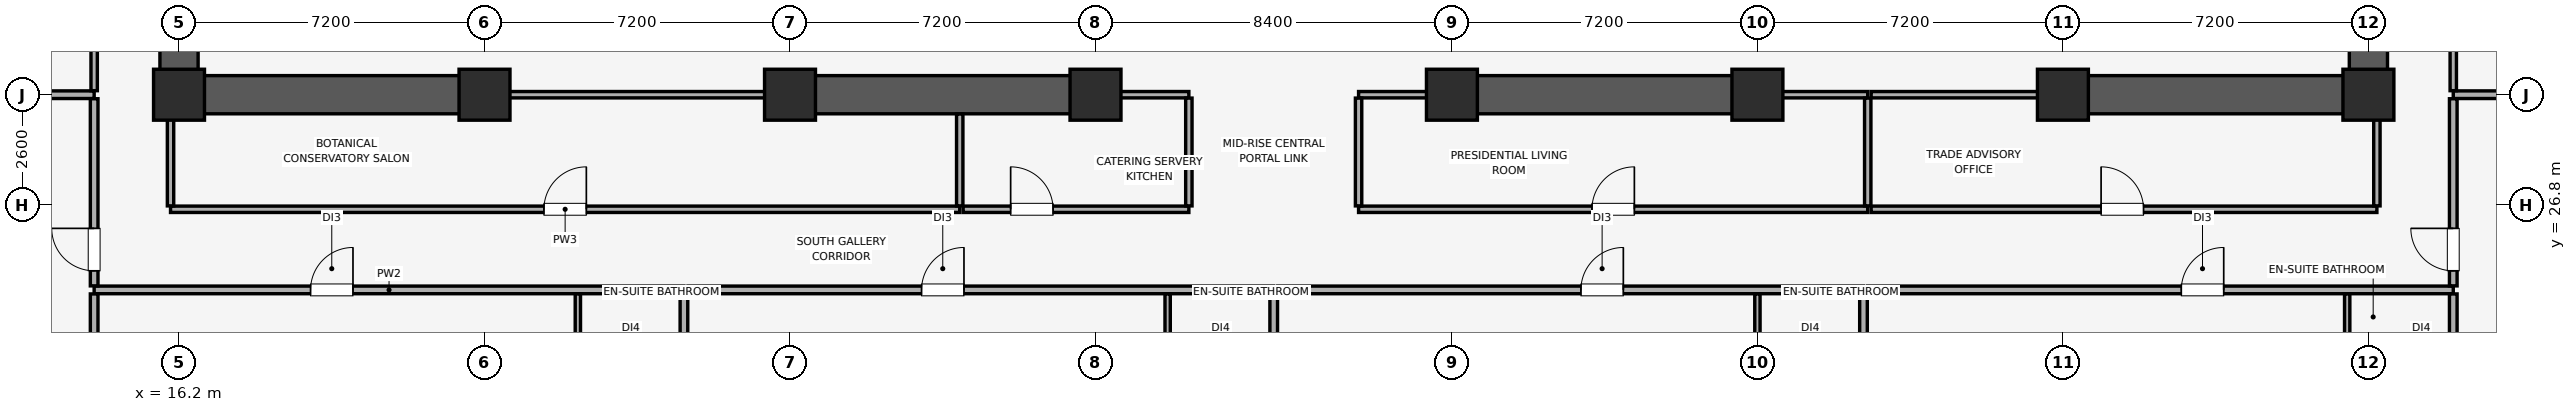
"""IFC4 building model, lengths in metres.
Left out: names, types, materials, properties, quantities, classifications, styles, units other than length and angle.
Written with IfcOpenShell. Run it as: python <this file> out.ifc"""

import sys

from ifc_helpers import new_model, si_unit, direction, frame, frame_2d, origin, origin_2d, place, context, subcontext, project, spatial, rectangle, extrude, element, fill, save


model = new_model("IFC4")
c1 = context("Model", 3, precision=1e-05, world=origin(), true_north=direction((0.0, 1.0)))
c2 = subcontext(c1, "Body", "Model", "MODEL_VIEW")
j1 = project(units=[si_unit("LENGTHUNIT", "METRE"), si_unit("PLANEANGLEUNIT", "RADIAN")], contexts=[c1])
p1 = place(None, origin())
s1 = spatial("IfcSite", under=j1, at=p1, CompositionType="ELEMENT")
p2 = place(p1, origin())
s2 = spatial("IfcBuilding", under=s1, at=p2, CompositionType="ELEMENT")
p3 = place(p2, frame((0.0, 0.0, 220.55)))
s3 = spatial("IfcBuildingStorey", under=s2, at=p3, CompositionType="ELEMENT", Elevation=220.55)
for number, where, z_axis, x_axis in (
    (1, (16.2, 29.4, 0.0), (0.0, 0.0, 1.0), (1.0, 0.0, 0.0)),
    (2, (23.4, 29.4, 0.0), (0.0, 0.0, 1.0), (1.0, 0.0, 0.0)),
    (3, (30.6, 29.4, 0.0), (0.0, 0.0, 1.0), (1.0, 0.0, 0.0)),
    (4, (37.8, 29.4, 0.0), (0.0, 0.0, 1.0), (1.0, 0.0, 0.0)),
    (5, (46.2, 29.4, 0.0), (0.0, 0.0, 1.0), (1.0, 0.0, 0.0)),
    (6, (53.4, 29.4, 0.0), (0.0, 0.0, 1.0), (1.0, 0.0, 0.0)),
    (7, (60.6, 29.4, 0.0), (0.0, 0.0, 1.0), (1.0, 0.0, 0.0)),
    (8, (67.8, 29.4, 0.0), (0.0, 0.0, 1.0), (1.0, 0.0, 0.0)),
):
    element("IfcColumn", number, at=place(p3, frame(where, z_axis=z_axis, x_axis=x_axis)), inside=s3, PredefinedType="COLUMN", context=c2, shape_type="SweptSolid", body=[
        extrude(rectangle(XDim=1.2, YDim=1.2, at=origin_2d()), origin(), (0.0, 0.0, 1.0), 3.56),
    ])
for number, where, z_axis, x_axis in (
    (9, (16.2, 29.4, 0.0), (0.0, 0.0, 1.0), (0.0, 1.0, 0.0)),
    (10, (67.8, 29.4, 0.0), (0.0, 0.0, 1.0), (0.0, 1.0, 0.0)),
):
    element("IfcWall", number, at=place(p3, frame(where, z_axis=z_axis, x_axis=x_axis)), inside=s3, PredefinedType="SHEAR", context=c2, shape_type="SweptSolid", body=[
        extrude(rectangle(XDim=19.2, YDim=0.9, at=frame_2d((9.6, 0.0))), origin(), (0.0, 0.0, 1.0), 3.56),
    ])
p4 = place(p3, frame((16.655, 29.4, 0.0), z_axis=(0.0, 0.0, 1.0), x_axis=(1.0, 0.0, 0.0)))
e11 = element("IfcWall", 11, at=p4, inside=s3, PredefinedType="SHEAR", context=c2, shape_type="SweptSolid", body=[
    extrude(rectangle(XDim=6.945, YDim=0.9, at=frame_2d((3.473, 0.0))), origin(), (0.0, 0.0, 1.0), 3.56),
])
for number, where, z_axis, x_axis in (
    (12, (30.4, 29.4, 0.0), (0.0, 0.0, 1.0), (1.0, 0.0, 0.0)),
    (13, (46.0, 29.4, 0.0), (0.0, 0.0, 1.0), (1.0, 0.0, 0.0)),
):
    element("IfcWall", number, at=place(p3, frame(where, z_axis=z_axis, x_axis=x_axis)), inside=s3, PredefinedType="SHEAR", context=c2, shape_type="SweptSolid", body=[
        extrude(rectangle(XDim=7.6, YDim=0.9, at=frame_2d((3.8, 0.0))), origin(), (0.0, 0.0, 1.0), 3.56),
    ])
p5 = place(p3, frame((60.4, 29.4, 0.0), z_axis=(0.0, 0.0, 1.0), x_axis=(1.0, 0.0, 0.0)))
e14 = element("IfcWall", 14, at=p5, inside=s3, PredefinedType="SHEAR", context=c2, shape_type="SweptSolid", body=[
    extrude(rectangle(XDim=6.945, YDim=0.9, at=frame_2d((3.473, 0.0))), origin(), (0.0, 0.0, 1.0), 3.56),
])
p6 = place(p3, frame((14.2, 24.8, 0.0), z_axis=(0.0, 0.0, 1.0), x_axis=(1.0, 0.0, 0.0)))
e15 = element("IfcWall", 15, at=p6, inside=s3, PredefinedType="PARTITIONING", context=c2, shape_type="SweptSolid", body=[
    extrude(rectangle(XDim=13.9, YDim=0.18, at=frame_2d((6.95, 0.0))), origin(), (0.0, 0.0, 1.0), 3.56),
])
p7 = place(p6, frame((5.1, 0.0, 0.0)))
e16 = element("IfcOpeningElement", 16, at=p7, cuts=e15, PredefinedType="OPENING", context=c2, shape_type="SweptSolid", body=[
    extrude(rectangle(XDim=1.0, YDim=2.15, at=frame_2d((0.5, 1.075))), frame((0.0, 0.1, 0.0), z_axis=(0.0, -1.0, 0.0), x_axis=(1.0, 0.0, 0.0)), (0.0, 0.0, 1.0), 0.2),
])
for number, where, z_axis, x_axis in (
    (17, (14.2, 3.15, 0.0), (0.0, 0.0, 1.0), (0.0, 1.0, 0.0)),
    (18, (28.1, 3.15, 0.0), (0.0, 0.0, 1.0), (0.0, 1.0, 0.0)),
):
    element("IfcWall", number, at=place(p3, frame(where, z_axis=z_axis, x_axis=x_axis)), inside=s3, PredefinedType="PARTITIONING", context=c2, shape_type="SweptSolid", body=[
        extrude(rectangle(XDim=21.555, YDim=0.18, at=frame_2d((10.778, 0.0))), origin(), (0.0, 0.0, 1.0), 3.56),
    ])
p8 = place(p3, frame((25.6, 22.317, 0.0), z_axis=(0.0, 0.0, 1.0), x_axis=(0.0, 1.0, 0.0)))
e19 = element("IfcWall", 19, at=p8, inside=s3, PredefinedType="PARTITIONING", context=c2, shape_type="SweptSolid", body=[
    extrude(rectangle(XDim=2.388, YDim=0.125, at=frame_2d((1.194, 0.0))), origin(), (0.0, 0.0, 1.0), 3.56),
])
p9 = place(p3, frame((28.195, 24.8, 0.0), z_axis=(0.0, 0.0, 1.0), x_axis=(1.0, 0.0, 0.0)))
e20 = element("IfcWall", 20, at=p9, inside=s3, PredefinedType="PARTITIONING", context=c2, shape_type="SweptSolid", body=[
    extrude(rectangle(XDim=13.805, YDim=0.18, at=frame_2d((6.902, 0.0))), origin(), (0.0, 0.0, 1.0), 3.56),
])
p10 = place(p9, frame((5.505, 0.0, 0.0)))
e21 = element("IfcOpeningElement", 21, at=p10, cuts=e20, PredefinedType="OPENING", context=c2, shape_type="SweptSolid", body=[
    extrude(rectangle(XDim=1.0, YDim=2.15, at=frame_2d((0.5, 1.075))), frame((0.0, 0.1, 0.0), z_axis=(0.0, -1.0, 0.0), x_axis=(1.0, 0.0, 0.0)), (0.0, 0.0, 1.0), 0.2),
])
p11 = place(p3, frame((42.0, 3.15, 0.0), z_axis=(0.0, 0.0, 1.0), x_axis=(0.0, 1.0, 0.0)))
e22 = element("IfcWall", 22, at=p11, inside=s3, PredefinedType="PARTITIONING", context=c2, shape_type="SweptSolid", body=[
    extrude(rectangle(XDim=21.555, YDim=0.18, at=frame_2d((10.778, 0.0))), origin(), (0.0, 0.0, 1.0), 2.96),
])
p12 = place(p3, frame((39.5, 22.317, 0.0), z_axis=(0.0, 0.0, 1.0), x_axis=(0.0, 1.0, 0.0)))
e23 = element("IfcWall", 23, at=p12, inside=s3, PredefinedType="PARTITIONING", context=c2, shape_type="SweptSolid", body=[
    extrude(rectangle(XDim=2.388, YDim=0.125, at=frame_2d((1.194, 0.0))), origin(), (0.0, 0.0, 1.0), 3.56),
])
p13 = place(p3, frame((42.095, 24.8, 0.0), z_axis=(0.0, 0.0, 1.0), x_axis=(1.0, 0.0, 0.0)))
e24 = element("IfcWall", 24, at=p13, inside=s3, PredefinedType="PARTITIONING", context=c2, shape_type="SweptSolid", body=[
    extrude(rectangle(XDim=13.805, YDim=0.18, at=frame_2d((6.902, 0.0))), origin(), (0.0, 0.0, 1.0), 3.56),
])
p14 = place(p13, frame((7.145, 0.0, 0.0)))
e25 = element("IfcOpeningElement", 25, at=p14, cuts=e24, PredefinedType="OPENING", context=c2, shape_type="SweptSolid", body=[
    extrude(rectangle(XDim=1.0, YDim=2.15, at=frame_2d((0.5, 1.075))), frame((0.0, 0.1, 0.0), z_axis=(0.0, -1.0, 0.0), x_axis=(1.0, 0.0, 0.0)), (0.0, 0.0, 1.0), 0.2),
])
p15 = place(p3, frame((55.9, 3.15, 0.0), z_axis=(0.0, 0.0, 1.0), x_axis=(0.0, 1.0, 0.0)))
e26 = element("IfcWall", 26, at=p15, inside=s3, PredefinedType="PARTITIONING", context=c2, shape_type="SweptSolid", body=[
    extrude(rectangle(XDim=21.555, YDim=0.18, at=frame_2d((10.778, 0.0))), origin(), (0.0, 0.0, 1.0), 3.56),
])
p16 = place(p3, frame((53.4, 22.317, 0.0), z_axis=(0.0, 0.0, 1.0), x_axis=(0.0, 1.0, 0.0)))
e27 = element("IfcWall", 27, at=p16, inside=s3, PredefinedType="PARTITIONING", context=c2, shape_type="SweptSolid", body=[
    extrude(rectangle(XDim=2.388, YDim=0.125, at=frame_2d((1.194, 0.0))), origin(), (0.0, 0.0, 1.0), 3.06),
])
p17 = place(p3, frame((55.995, 24.8, 0.0), z_axis=(0.0, 0.0, 1.0), x_axis=(1.0, 0.0, 0.0)))
e28 = element("IfcWall", 28, at=p17, inside=s3, PredefinedType="PARTITIONING", context=c2, shape_type="SweptSolid", body=[
    extrude(rectangle(XDim=13.805, YDim=0.18, at=frame_2d((6.902, 0.0))), origin(), (0.0, 0.0, 1.0), 3.56),
])
p18 = place(p17, frame((7.395, 0.0, 0.0)))
e29 = element("IfcOpeningElement", 29, at=p18, cuts=e28, PredefinedType="OPENING", context=c2, shape_type="SweptSolid", body=[
    extrude(rectangle(XDim=1.0, YDim=2.15, at=frame_2d((0.5, 1.075))), frame((0.0, 0.1, 0.0), z_axis=(0.0, -1.0, 0.0), x_axis=(1.0, 0.0, 0.0)), (0.0, 0.0, 1.0), 0.2),
])
p19 = place(p3, frame((69.8, 3.15, 0.0), z_axis=(0.0, 0.0, 1.0), x_axis=(0.0, 1.0, 0.0)))
e30 = element("IfcWall", 30, at=p19, inside=s3, PredefinedType="PARTITIONING", context=c2, shape_type="SweptSolid", body=[
    extrude(rectangle(XDim=21.555, YDim=0.18, at=frame_2d((10.778, 0.0))), origin(), (0.0, 0.0, 1.0), 3.56),
])
p20 = place(p3, frame((67.3, 22.317, 0.0), z_axis=(0.0, 0.0, 1.0), x_axis=(0.0, 1.0, 0.0)))
e31 = element("IfcWall", 31, at=p20, inside=s3, PredefinedType="PARTITIONING", context=c2, shape_type="SweptSolid", body=[
    extrude(rectangle(XDim=2.388, YDim=0.125, at=frame_2d((1.194, 0.0))), origin(), (0.0, 0.0, 1.0), 3.56),
])
p21 = place(p3, frame((3.15, 29.4, 0.0), z_axis=(0.0, 0.0, 1.0), x_axis=(1.0, 0.0, 0.0)))
e32 = element("IfcWall", 32, at=p21, inside=s3, PredefinedType="PARTITIONING", context=c2, shape_type="SweptSolid", body=[
    extrude(rectangle(XDim=11.05, YDim=0.18, at=frame_2d((5.525, 0.0))), origin(), (0.0, 0.0, 1.0), 2.719),
])
p22 = place(p3, frame((14.2, 24.895, 0.0), z_axis=(0.0, 0.0, 1.0), x_axis=(0.0, 1.0, 0.0)))
e33 = element("IfcWall", 33, at=p22, inside=s3, PredefinedType="PARTITIONING", context=c2, shape_type="SweptSolid", body=[
    extrude(rectangle(XDim=4.41, YDim=0.18, at=frame_2d((2.205, 0.0))), origin(), (0.0, 0.0, 1.0), 3.56),
])
p23 = place(p22, frame((0.355, 0.0, 0.0)))
e34 = element("IfcOpeningElement", 34, at=p23, cuts=e33, PredefinedType="OPENING", context=c2, shape_type="SweptSolid", body=[
    extrude(rectangle(XDim=1.0, YDim=2.15, at=frame_2d((0.5, 1.075))), frame((0.0, 0.1, 0.0), z_axis=(0.0, -1.0, 0.0), x_axis=(1.0, 0.0, 0.0)), (0.0, 0.0, 1.0), 0.2),
])
p24 = place(p3, frame((69.8, 29.4, 0.0), z_axis=(0.0, 0.0, 1.0), x_axis=(1.0, 0.0, 0.0)))
e35 = element("IfcWall", 35, at=p24, inside=s3, PredefinedType="PARTITIONING", context=c2, shape_type="SweptSolid", body=[
    extrude(rectangle(XDim=11.05, YDim=0.18, at=frame_2d((5.525, 0.0))), origin(), (0.0, 0.0, 1.0), 2.719),
])
p25 = place(p3, frame((69.8, 24.895, 0.0), z_axis=(0.0, 0.0, 1.0), x_axis=(0.0, 1.0, 0.0)))
e36 = element("IfcWall", 36, at=p25, inside=s3, PredefinedType="PARTITIONING", context=c2, shape_type="SweptSolid", body=[
    extrude(rectangle(XDim=4.41, YDim=0.18, at=frame_2d((2.205, 0.0))), origin(), (0.0, 0.0, 1.0), 3.56),
])
p26 = place(p25, frame((0.355, 0.0, 0.0)))
e37 = element("IfcOpeningElement", 37, at=p26, cuts=e36, PredefinedType="OPENING", context=c2, shape_type="SweptSolid", body=[
    extrude(rectangle(XDim=1.0, YDim=2.15, at=frame_2d((0.5, 1.075))), frame((0.0, 0.1, 0.0), z_axis=(0.0, -1.0, 0.0), x_axis=(1.0, 0.0, 0.0)), (0.0, 0.0, 1.0), 0.2),
])
p27 = place(p3, frame((16.0, 26.7, 0.0), z_axis=(0.0, 0.0, 1.0), x_axis=(1.0, 0.0, 0.0)))
e38 = element("IfcWall", 38, at=p27, inside=s3, PredefinedType="PARTITIONING", context=c2, shape_type="SweptSolid", body=[
    extrude(rectangle(XDim=18.6, YDim=0.15, at=frame_2d((9.3, 0.0))), origin(), (0.0, 0.0, 1.0), 3.56),
])
p28 = place(p27, frame((8.8, 0.0, 0.0)))
e39 = element("IfcOpeningElement", 39, at=p28, cuts=e38, PredefinedType="OPENING", context=c2, shape_type="SweptSolid", body=[
    extrude(rectangle(XDim=1.0, YDim=2.15, at=frame_2d((0.5, 1.075))), frame((0.0, 0.085, 0.0), z_axis=(0.0, -1.0, 0.0), x_axis=(1.0, 0.0, 0.0)), (0.0, 0.0, 1.0), 0.17),
])
p29 = place(p3, frame((23.61, 29.4, 0.0), z_axis=(0.0, 0.0, 1.0), x_axis=(1.0, 0.0, 0.0)))
e40 = element("IfcWall", 40, at=p29, inside=s3, PredefinedType="PARTITIONING", context=c2, shape_type="SweptSolid", body=[
    extrude(rectangle(XDim=6.78, YDim=0.15, at=frame_2d((3.39, 0.0))), origin(), (0.0, 0.0, 1.0), 2.46),
])
p30 = place(p3, frame((16.0, 26.78, 0.0), z_axis=(0.0, 0.0, 1.0), x_axis=(0.0, 1.0, 0.0)))
e41 = element("IfcWall", 41, at=p30, inside=s3, PredefinedType="PARTITIONING", context=c2, shape_type="SweptSolid", body=[
    extrude(rectangle(XDim=2.61, YDim=0.15, at=frame_2d((1.305, 0.0))), origin(), (0.0, 0.0, 1.0), 3.06),
])
p31 = place(p3, frame((34.6, 26.78, 0.0), z_axis=(0.0, 0.0, 1.0), x_axis=(0.0, 1.0, 0.0)))
e42 = element("IfcWall", 42, at=p31, inside=s3, PredefinedType="PARTITIONING", context=c2, shape_type="SweptSolid", body=[
    extrude(rectangle(XDim=2.165, YDim=0.15, at=frame_2d((1.083, 0.0))), origin(), (0.0, 0.0, 1.0), 3.56),
])
p32 = place(p3, frame((34.68, 26.7, 0.0), z_axis=(0.0, 0.0, 1.0), x_axis=(1.0, 0.0, 0.0)))
e43 = element("IfcWall", 43, at=p32, inside=s3, PredefinedType="PARTITIONING", context=c2, shape_type="SweptSolid", body=[
    extrude(rectangle(XDim=5.32, YDim=0.15, at=frame_2d((2.66, 0.0))), origin(), (0.0, 0.0, 1.0), 3.56),
])
p33 = place(p32, frame((1.12, 0.0, 0.0)))
e44 = element("IfcOpeningElement", 44, at=p33, cuts=e43, PredefinedType="OPENING", context=c2, shape_type="SweptSolid", body=[
    extrude(rectangle(XDim=1.0, YDim=2.15, at=frame_2d((0.5, 1.075))), frame((0.0, 0.085, 0.0), z_axis=(0.0, -1.0, 0.0), x_axis=(1.0, 0.0, 0.0)), (0.0, 0.0, 1.0), 0.17),
])
p34 = place(p3, frame((38.01, 29.4, 0.0), z_axis=(0.0, 0.0, 1.0), x_axis=(1.0, 0.0, 0.0)))
e45 = element("IfcWall", 45, at=p34, inside=s3, PredefinedType="PARTITIONING", context=c2, shape_type="SweptSolid", body=[
    extrude(rectangle(XDim=1.99, YDim=0.15, at=frame_2d((0.995, 0.0))), origin(), (0.0, 0.0, 1.0), 2.46),
])
p35 = place(p3, frame((40.0, 26.78, 0.0), z_axis=(0.0, 0.0, 1.0), x_axis=(0.0, 1.0, 0.0)))
e46 = element("IfcWall", 46, at=p35, inside=s3, PredefinedType="PARTITIONING", context=c2, shape_type="SweptSolid", body=[
    extrude(rectangle(XDim=2.54, YDim=0.15, at=frame_2d((1.27, 0.0))), origin(), (0.0, 0.0, 1.0), 3.56),
])
p36 = place(p3, frame((44.0, 26.7, 0.0), z_axis=(0.0, 0.0, 1.0), x_axis=(1.0, 0.0, 0.0)))
e47 = element("IfcWall", 47, at=p36, inside=s3, PredefinedType="PARTITIONING", context=c2, shape_type="SweptSolid", body=[
    extrude(rectangle(XDim=12.0, YDim=0.15, at=frame_2d((6.0, 0.0))), origin(), (0.0, 0.0, 1.0), 3.56),
])
p37 = place(p36, frame((5.5, 0.0, 0.0)))
e48 = element("IfcOpeningElement", 48, at=p37, cuts=e47, PredefinedType="OPENING", context=c2, shape_type="SweptSolid", body=[
    extrude(rectangle(XDim=1.0, YDim=2.15, at=frame_2d((0.5, 1.075))), frame((0.0, 0.085, 0.0), z_axis=(0.0, -1.0, 0.0), x_axis=(1.0, 0.0, 0.0)), (0.0, 0.0, 1.0), 0.17),
])
p38 = place(p3, frame((44.0, 29.4, 0.0), z_axis=(0.0, 0.0, 1.0), x_axis=(1.0, 0.0, 0.0)))
e49 = element("IfcWall", 49, at=p38, inside=s3, PredefinedType="PARTITIONING", context=c2, shape_type="SweptSolid", body=[
    extrude(rectangle(XDim=1.99, YDim=0.15, at=frame_2d((0.995, 0.0))), origin(), (0.0, 0.0, 1.0), 2.46),
])
p39 = place(p3, frame((53.61, 29.4, 0.0), z_axis=(0.0, 0.0, 1.0), x_axis=(1.0, 0.0, 0.0)))
e50 = element("IfcWall", 50, at=p39, inside=s3, PredefinedType="PARTITIONING", context=c2, shape_type="SweptSolid", body=[
    extrude(rectangle(XDim=2.39, YDim=0.15, at=frame_2d((1.195, 0.0))), origin(), (0.0, 0.0, 1.0), 2.46),
])
for number, where, z_axis, x_axis in (
    (51, (44.0, 26.78, 0.0), (0.0, 0.0, 1.0), (0.0, 1.0, 0.0)),
    (52, (56.0, 26.78, 0.0), (0.0, 0.0, 1.0), (0.0, 1.0, 0.0)),
):
    element("IfcWall", number, at=place(p3, frame(where, z_axis=z_axis, x_axis=x_axis)), inside=s3, PredefinedType="PARTITIONING", context=c2, shape_type="SweptSolid", body=[
        extrude(rectangle(XDim=2.54, YDim=0.15, at=frame_2d((1.27, 0.0))), origin(), (0.0, 0.0, 1.0), 3.56),
    ])
p40 = place(p3, frame((56.08, 26.7, 0.0), z_axis=(0.0, 0.0, 1.0), x_axis=(1.0, 0.0, 0.0)))
e53 = element("IfcWall", 53, at=p40, inside=s3, PredefinedType="PARTITIONING", context=c2, shape_type="SweptSolid", body=[
    extrude(rectangle(XDim=11.92, YDim=0.15, at=frame_2d((5.96, 0.0))), origin(), (0.0, 0.0, 1.0), 3.56),
])
p41 = place(p40, frame((5.42, 0.0, 0.0)))
e54 = element("IfcOpeningElement", 54, at=p41, cuts=e53, PredefinedType="OPENING", context=c2, shape_type="SweptSolid", body=[
    extrude(rectangle(XDim=1.0, YDim=2.15, at=frame_2d((0.5, 1.075))), frame((0.0, 0.085, 0.0), z_axis=(0.0, -1.0, 0.0), x_axis=(1.0, 0.0, 0.0)), (0.0, 0.0, 1.0), 0.17),
])
p42 = place(p3, frame((56.08, 29.4, 0.0), z_axis=(0.0, 0.0, 1.0), x_axis=(1.0, 0.0, 0.0)))
e55 = element("IfcWall", 55, at=p42, inside=s3, PredefinedType="PARTITIONING", context=c2, shape_type="SweptSolid", body=[
    extrude(rectangle(XDim=4.31, YDim=0.15, at=frame_2d((2.155, 0.0))), origin(), (0.0, 0.0, 1.0), 2.46),
])
p43 = place(p3, frame((68.0, 26.78, 0.0), z_axis=(0.0, 0.0, 1.0), x_axis=(0.0, 1.0, 0.0)))
e56 = element("IfcWall", 56, at=p43, inside=s3, PredefinedType="PARTITIONING", context=c2, shape_type="SweptSolid", body=[
    extrude(rectangle(XDim=2.61, YDim=0.15, at=frame_2d((1.305, 0.0))), origin(), (0.0, 0.0, 1.0), 3.06),
])
p44 = place(p3, frame((14.2, 29.495, 0.0), z_axis=(0.0, 0.0, 1.0), x_axis=(0.0, 1.0, 0.0)))
e57 = element("IfcWall", 57, at=p44, inside=s3, PredefinedType="PARTITIONING", context=c2, shape_type="SweptSolid", body=[
    extrude(rectangle(XDim=6.625, YDim=0.15, at=frame_2d((3.312, 0.0))), origin(), (0.0, 0.0, 1.0), 3.56),
])
p45 = place(p44, frame((2.805, 0.0, 0.0)))
e58 = element("IfcOpeningElement", 58, at=p45, cuts=e57, PredefinedType="OPENING", context=c2, shape_type="SweptSolid", body=[
    extrude(rectangle(XDim=1.0, YDim=2.15, at=frame_2d((0.5, 1.075))), frame((0.0, 0.085, 0.0), z_axis=(0.0, -1.0, 0.0), x_axis=(1.0, 0.0, 0.0)), (0.0, 0.0, 1.0), 0.17),
])
p46 = place(p3, frame((69.8, 29.495, 0.0), z_axis=(0.0, 0.0, 1.0), x_axis=(0.0, 1.0, 0.0)))
e59 = element("IfcWall", 59, at=p46, inside=s3, PredefinedType="PARTITIONING", context=c2, shape_type="SweptSolid", body=[
    extrude(rectangle(XDim=8.925, YDim=0.15, at=frame_2d((4.462, 0.0))), origin(), (0.0, 0.0, 1.0), 3.56),
])
p47 = place(p46, frame((3.955, 0.0, 0.0)))
e60 = element("IfcOpeningElement", 60, at=p47, cuts=e59, PredefinedType="OPENING", context=c2, shape_type="SweptSolid", body=[
    extrude(rectangle(XDim=1.0, YDim=2.15, at=frame_2d((0.5, 1.075))), frame((0.0, 0.085, 0.0), z_axis=(0.0, -1.0, 0.0), x_axis=(1.0, 0.0, 0.0)), (0.0, 0.0, 1.0), 0.17),
])
p48 = place(p7, origin())
e61 = element("IfcDoor", 61, at=p48, inside=s3, OperationType="SINGLE_SWING_RIGHT", PredefinedType="DOOR", context=c2, shape_type="SweptSolid", body=[
    extrude(rectangle(XDim=1.0, YDim=2.15, at=frame_2d((0.5, 1.075))), frame((0.0, 0.025, 0.0), z_axis=(0.0, -1.0, 0.0), x_axis=(1.0, 0.0, 0.0)), (0.0, 0.0, 1.0), 0.05),
])
fill(e16, e61)
p49 = place(p10, origin())
e62 = element("IfcDoor", 62, at=p49, inside=s3, OperationType="SINGLE_SWING_RIGHT", PredefinedType="DOOR", context=c2, shape_type="SweptSolid", body=[
    extrude(rectangle(XDim=1.0, YDim=2.15, at=frame_2d((0.5, 1.075))), frame((0.0, 0.025, 0.0), z_axis=(0.0, -1.0, 0.0), x_axis=(1.0, 0.0, 0.0)), (0.0, 0.0, 1.0), 0.05),
])
fill(e21, e62)
p50 = place(p14, origin())
e63 = element("IfcDoor", 63, at=p50, inside=s3, OperationType="SINGLE_SWING_RIGHT", PredefinedType="DOOR", context=c2, shape_type="SweptSolid", body=[
    extrude(rectangle(XDim=1.0, YDim=2.15, at=frame_2d((0.5, 1.075))), frame((0.0, 0.025, 0.0), z_axis=(0.0, -1.0, 0.0), x_axis=(1.0, 0.0, 0.0)), (0.0, 0.0, 1.0), 0.05),
])
fill(e25, e63)
p51 = place(p18, origin())
e64 = element("IfcDoor", 64, at=p51, inside=s3, OperationType="SINGLE_SWING_RIGHT", PredefinedType="DOOR", context=c2, shape_type="SweptSolid", body=[
    extrude(rectangle(XDim=1.0, YDim=2.15, at=frame_2d((0.5, 1.075))), frame((0.0, 0.025, 0.0), z_axis=(0.0, -1.0, 0.0), x_axis=(1.0, 0.0, 0.0)), (0.0, 0.0, 1.0), 0.05),
])
fill(e29, e64)
p52 = place(p23, origin())
e65 = element("IfcDoor", 65, at=p52, inside=s3, OperationType="SINGLE_SWING_RIGHT", PredefinedType="DOOR", context=c2, shape_type="SweptSolid", body=[
    extrude(rectangle(XDim=1.0, YDim=2.15, at=frame_2d((0.5, 1.075))), frame((0.0, 0.025, 0.0), z_axis=(0.0, -1.0, 0.0), x_axis=(1.0, 0.0, 0.0)), (0.0, 0.0, 1.0), 0.05),
])
fill(e34, e65)
p53 = place(p26, origin())
e66 = element("IfcDoor", 66, at=p53, inside=s3, OperationType="SINGLE_SWING_RIGHT", PredefinedType="DOOR", context=c2, shape_type="SweptSolid", body=[
    extrude(rectangle(XDim=1.0, YDim=2.15, at=frame_2d((0.5, 1.075))), frame((0.0, 0.025, 0.0), z_axis=(0.0, -1.0, 0.0), x_axis=(1.0, 0.0, 0.0)), (0.0, 0.0, 1.0), 0.05),
])
fill(e37, e66)
p54 = place(p28, origin())
e67 = element("IfcDoor", 67, at=p54, inside=s3, OperationType="SINGLE_SWING_RIGHT", PredefinedType="DOOR", context=c2, shape_type="SweptSolid", body=[
    extrude(rectangle(XDim=1.0, YDim=2.15, at=frame_2d((0.5, 1.075))), frame((0.0, 0.025, 0.0), z_axis=(0.0, -1.0, 0.0), x_axis=(1.0, 0.0, 0.0)), (0.0, 0.0, 1.0), 0.05),
])
fill(e39, e67)
p55 = place(p33, origin())
e68 = element("IfcDoor", 68, at=p55, inside=s3, OperationType="SINGLE_SWING_LEFT", PredefinedType="DOOR", context=c2, shape_type="SweptSolid", body=[
    extrude(rectangle(XDim=1.0, YDim=2.15, at=frame_2d((0.5, 1.075))), frame((0.0, 0.025, 0.0), z_axis=(0.0, -1.0, 0.0), x_axis=(1.0, 0.0, 0.0)), (0.0, 0.0, 1.0), 0.05),
])
fill(e44, e68)
p56 = place(p37, origin())
e69 = element("IfcDoor", 69, at=p56, inside=s3, OperationType="SINGLE_SWING_RIGHT", PredefinedType="DOOR", context=c2, shape_type="SweptSolid", body=[
    extrude(rectangle(XDim=1.0, YDim=2.15, at=frame_2d((0.5, 1.075))), frame((0.0, 0.025, 0.0), z_axis=(0.0, -1.0, 0.0), x_axis=(1.0, 0.0, 0.0)), (0.0, 0.0, 1.0), 0.05),
])
fill(e48, e69)
p57 = place(p41, origin())
e70 = element("IfcDoor", 70, at=p57, inside=s3, OperationType="SINGLE_SWING_LEFT", PredefinedType="DOOR", context=c2, shape_type="SweptSolid", body=[
    extrude(rectangle(XDim=1.0, YDim=2.15, at=frame_2d((0.5, 1.075))), frame((0.0, 0.025, 0.0), z_axis=(0.0, -1.0, 0.0), x_axis=(1.0, 0.0, 0.0)), (0.0, 0.0, 1.0), 0.05),
])
fill(e54, e70)
save(model, sys.argv[1])
